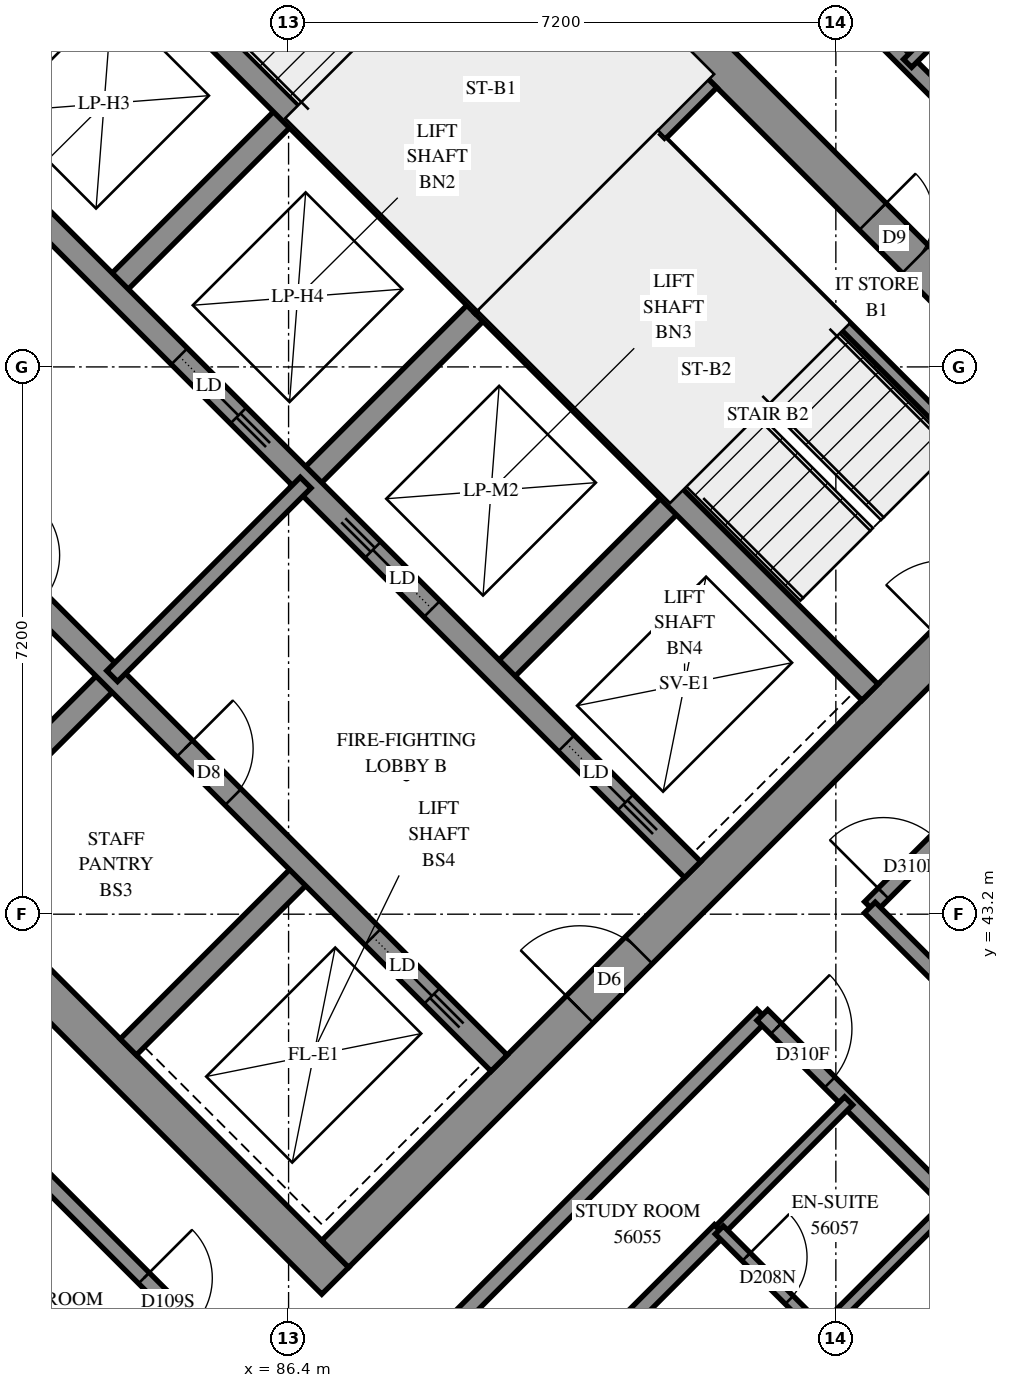
"""IFC4 building model, lengths in metres.
Left out: names, types, materials, properties, quantities, classifications, styles, units other than length and angle.
Written with IfcOpenShell. Run it as: python <this file> out.ifc"""

import sys

from ifc_helpers import new_model, si_unit, direction, frame, frame_2d, origin, place, context, subcontext, project, spatial, rectangle, extrude, element, fill, save


model = new_model("IFC4")
c1 = context("Model", 3, precision=1e-05, world=origin(), true_north=direction((0.0, 1.0)))
c2 = subcontext(c1, "Body", "Model", "MODEL_VIEW")
j1 = project(units=[si_unit("LENGTHUNIT", "METRE"), si_unit("PLANEANGLEUNIT", "RADIAN")], contexts=[c1])
p1 = place(None, origin())
s1 = spatial("IfcSite", under=j1, at=p1, CompositionType="ELEMENT")
p2 = place(p1, origin())
s2 = spatial("IfcBuilding", under=s1, at=p2, CompositionType="ELEMENT")
p3 = place(p2, frame((0.0, 0.0, 206.6)))
s3 = spatial("IfcBuildingStorey", under=s2, at=p3, CompositionType="ELEMENT", Elevation=206.6)
p4 = place(p3, frame((76.124, 49.267, -0.3), z_axis=(0.0, 0.0, 1.0), x_axis=(0.7071067812, -0.7071067812, 0.0)))
e1 = element("IfcWall", 1, at=p4, inside=s3, PredefinedType="SHEAR", context=c2, shape_type="SweptSolid", body=[
    extrude(rectangle(XDim=15.4, YDim=0.5, at=frame_2d((7.7, 0.0))), origin(), (0.0, 0.0, 1.0), 2.7),
])
p5 = place(p3, frame((86.66, 59.802, -0.3), z_axis=(0.0, 0.0, 1.0), x_axis=(0.7071067812, -0.7071067812, 0.0)))
e2 = element("IfcWall", 2, at=p5, inside=s3, PredefinedType="SHEAR", context=c2, shape_type="SweptSolid", body=[
    extrude(rectangle(XDim=15.4, YDim=0.5, at=frame_2d((7.7, 0.0))), origin(), (0.0, 0.0, 1.0), 2.7),
])
p6 = place(p5, frame((10.5, 0.0, 0.3)))
e3 = element("IfcOpeningElement", 3, at=p6, cuts=e2, PredefinedType="OPENING", context=c2, shape_type="SweptSolid", body=[
    extrude(rectangle(XDim=0.8, YDim=2.1, at=frame_2d((0.4, 1.05))), frame((0.0, 0.26, 0.0), z_axis=(0.0, -1.0, 0.0), x_axis=(1.0, 0.0, 0.0)), (0.0, 0.0, 1.0), 0.52),
])
p7 = place(p3, frame((76.478, 49.267, -0.3), z_axis=(0.0, 0.0, 1.0), x_axis=(0.7071067812, 0.7071067812, 0.0)))
e4 = element("IfcWall", 4, at=p7, inside=s3, PredefinedType="SHEAR", context=c2, shape_type="SweptSolid", body=[
    extrude(rectangle(XDim=14.4, YDim=0.5, at=frame_2d((7.2, 0.0))), origin(), (0.0, 0.0, 1.0), 2.7),
])
p8 = place(p7, frame((4.55, 0.0, 0.3)))
e5 = element("IfcOpeningElement", 5, at=p8, cuts=e4, PredefinedType="OPENING", context=c2, shape_type="SweptSolid", body=[
    extrude(rectangle(XDim=1.1, YDim=2.1, at=frame_2d((0.55, 1.05))), frame((0.0, 0.26, 0.0), z_axis=(0.0, -1.0, 0.0), x_axis=(1.0, 0.0, 0.0)), (0.0, 0.0, 1.0), 0.52),
])
p9 = place(p7, frame((11.35, 0.0, 0.3)))
e6 = element("IfcOpeningElement", 6, at=p9, cuts=e4, PredefinedType="OPENING", context=c2, shape_type="SweptSolid", body=[
    extrude(rectangle(XDim=1.1, YDim=2.1, at=frame_2d((0.55, 1.05))), frame((0.0, 0.26, 0.0), z_axis=(0.0, -1.0, 0.0), x_axis=(1.0, 0.0, 0.0)), (0.0, 0.0, 1.0), 0.52),
])
p10 = place(p3, frame((87.013, 38.731, -0.3), z_axis=(0.0, 0.0, 1.0), x_axis=(0.7071067812, 0.7071067812, 0.0)))
e7 = element("IfcWall", 7, at=p10, inside=s3, PredefinedType="SHEAR", context=c2, shape_type="SweptSolid", body=[
    extrude(rectangle(XDim=14.4, YDim=0.5, at=frame_2d((7.2, 0.0))), origin(), (0.0, 0.0, 1.0), 2.7),
])
p11 = place(p10, frame((4.55, 0.0, 0.3)))
e8 = element("IfcOpeningElement", 8, at=p11, cuts=e7, PredefinedType="OPENING", context=c2, shape_type="SweptSolid", body=[
    extrude(rectangle(XDim=1.1, YDim=2.1, at=frame_2d((0.55, 1.05))), frame((0.0, 0.26, 0.0), z_axis=(0.0, -1.0, 0.0), x_axis=(1.0, 0.0, 0.0)), (0.0, 0.0, 1.0), 0.52),
])
p12 = place(p10, frame((11.35, 0.0, 0.3)))
e9 = element("IfcOpeningElement", 9, at=p12, cuts=e7, PredefinedType="OPENING", context=c2, shape_type="SweptSolid", body=[
    extrude(rectangle(XDim=1.1, YDim=2.1, at=frame_2d((0.55, 1.05))), frame((0.0, 0.26, 0.0), z_axis=(0.0, -1.0, 0.0), x_axis=(1.0, 0.0, 0.0)), (0.0, 0.0, 1.0), 0.52),
])
p13 = place(p3, frame((84.079, 51.423, 0.0), z_axis=(0.0, 0.0, 1.0), x_axis=(0.7071219326, 0.7070916295, 0.0)))
e10 = element("IfcWall", 10, at=p13, inside=s3, PredefinedType="SOLIDWALL", context=c2, shape_type="SweptSolid", body=[
    extrude(rectangle(XDim=3.3, YDim=0.3, at=frame_2d((1.65, 0.0))), origin(), (0.0, 0.0, 1.0), 3.1),
])
p14 = place(p3, frame((81.746, 43.999, 0.0), z_axis=(0.0, 0.0, 1.0), x_axis=(0.7071067812, 0.7071067812, 0.0)))
e11 = element("IfcWall", 11, at=p14, inside=s3, PredefinedType="SOLIDWALL", context=c2, shape_type="SweptSolid", body=[
    extrude(rectangle(XDim=3.3, YDim=0.3, at=frame_2d((1.65, 0.0))), origin(), (0.0, 0.0, 1.0), 3.1),
])
p15 = place(p3, frame((86.625, 48.878, 0.0), z_axis=(0.0, 0.0, 1.0), x_axis=(0.7071067812, 0.7071067812, 0.0)))
e12 = element("IfcWall", 12, at=p15, inside=s3, PredefinedType="SOLIDWALL", context=c2, shape_type="SweptSolid", body=[
    extrude(rectangle(XDim=3.3, YDim=0.3, at=frame_2d((1.65, 0.0))), origin(), (0.0, 0.0, 1.0), 3.1),
])
p16 = place(p3, frame((84.291, 41.453, 0.0), z_axis=(0.0, 0.0, 1.0), x_axis=(0.7071067812, 0.7071067812, 0.0)))
e13 = element("IfcWall", 13, at=p16, inside=s3, PredefinedType="SOLIDWALL", context=c2, shape_type="SweptSolid", body=[
    extrude(rectangle(XDim=3.3, YDim=0.3, at=frame_2d((1.65, 0.0))), origin(), (0.0, 0.0, 1.0), 3.1),
])
p17 = place(p3, frame((89.17, 46.332, 0.0), z_axis=(0.0, 0.0, 1.0), x_axis=(0.7071067812, 0.7071067812, 0.0)))
e14 = element("IfcWall", 14, at=p17, inside=s3, PredefinedType="SOLIDWALL", context=c2, shape_type="SweptSolid", body=[
    extrude(rectangle(XDim=3.3, YDim=0.3, at=frame_2d((1.65, 0.0))), origin(), (0.0, 0.0, 1.0), 3.1),
])
p18 = place(p3, frame((78.988, 51.423, 0.0), z_axis=(0.0, 0.0, 1.0), x_axis=(0.7071067812, -0.7071067812, 0.0)))
e15 = element("IfcWall", 15, at=p18, inside=s3, PredefinedType="SOLIDWALL", context=c2, shape_type="SweptSolid", body=[
    extrude(rectangle(XDim=14.4, YDim=0.3, at=frame_2d((7.2, 0.0))), origin(), (0.0, 0.0, 1.0), 3.1),
])
p19 = place(p18, frame((1.35, 0.0, 0.0)))
e16 = element("IfcOpeningElement", 16, at=p19, cuts=e15, PredefinedType="OPENING", context=c2, shape_type="SweptSolid", body=[
    extrude(rectangle(XDim=0.9, YDim=2.1, at=frame_2d((0.45, 1.05))), frame((0.0, 0.16, 0.0), z_axis=(0.0, -1.0, 0.0), x_axis=(1.0, 0.0, 0.0)), (0.0, 0.0, 1.0), 0.32),
])
p20 = place(p18, frame((4.95, 0.0, 0.0)))
e17 = element("IfcOpeningElement", 17, at=p20, cuts=e15, PredefinedType="OPENING", context=c2, shape_type="SweptSolid", body=[
    extrude(rectangle(XDim=0.9, YDim=2.1, at=frame_2d((0.45, 1.05))), frame((0.0, 0.16, 0.0), z_axis=(0.0, -1.0, 0.0), x_axis=(1.0, 0.0, 0.0)), (0.0, 0.0, 1.0), 0.32),
])
p21 = place(p18, frame((8.55, 0.0, 0.0)))
e18 = element("IfcOpeningElement", 18, at=p21, cuts=e15, PredefinedType="OPENING", context=c2, shape_type="SweptSolid", body=[
    extrude(rectangle(XDim=0.9, YDim=2.1, at=frame_2d((0.45, 1.05))), frame((0.0, 0.16, 0.0), z_axis=(0.0, -1.0, 0.0), x_axis=(1.0, 0.0, 0.0)), (0.0, 0.0, 1.0), 0.32),
])
p22 = place(p18, frame((12.05, 0.0, 0.0)))
e19 = element("IfcOpeningElement", 19, at=p22, cuts=e15, PredefinedType="OPENING", context=c2, shape_type="SweptSolid", body=[
    extrude(rectangle(XDim=1.1, YDim=2.1, at=frame_2d((0.55, 1.05))), frame((0.0, 0.16, 0.0), z_axis=(0.0, -1.0, 0.0), x_axis=(1.0, 0.0, 0.0)), (0.0, 0.0, 1.0), 0.32),
])
p23 = place(p3, frame((81.534, 53.969, 0.0), z_axis=(0.0, 0.0, 1.0), x_axis=(0.707103309, -0.7071102534, 0.0)))
e20 = element("IfcWall", 20, at=p23, inside=s3, PredefinedType="SOLIDWALL", context=c2, shape_type="SweptSolid", body=[
    extrude(rectangle(XDim=14.4, YDim=0.3, at=frame_2d((7.2, 0.0))), origin(), (0.0, 0.0, 1.0), 3.1),
])
p24 = place(p23, frame((1.25, 0.0, 0.0)))
e21 = element("IfcOpeningElement", 21, at=p24, cuts=e20, PredefinedType="OPENING", context=c2, shape_type="SweptSolid", body=[
    extrude(rectangle(XDim=1.1, YDim=2.1, at=frame_2d((0.55, 1.05))), frame((0.0, 0.16, 0.0), z_axis=(0.0, -1.0, 0.0), x_axis=(1.0, 0.0, 0.0)), (0.0, 0.0, 1.0), 0.32),
])
p25 = place(p23, frame((4.85, 0.0, 0.0)))
e22 = element("IfcOpeningElement", 22, at=p25, cuts=e20, PredefinedType="OPENING", context=c2, shape_type="SweptSolid", body=[
    extrude(rectangle(XDim=1.1, YDim=2.1, at=frame_2d((0.55, 1.05))), frame((0.0, 0.16, 0.0), z_axis=(0.0, -1.0, 0.0), x_axis=(1.0, 0.0, 0.0)), (0.0, 0.0, 1.0), 0.32),
])
p26 = place(p23, frame((8.45, 0.0, 0.0)))
e23 = element("IfcOpeningElement", 23, at=p26, cuts=e20, PredefinedType="OPENING", context=c2, shape_type="SweptSolid", body=[
    extrude(rectangle(XDim=1.1, YDim=2.1, at=frame_2d((0.55, 1.05))), frame((0.0, 0.16, 0.0), z_axis=(0.0, -1.0, 0.0), x_axis=(1.0, 0.0, 0.0)), (0.0, 0.0, 1.0), 0.32),
])
p27 = place(p23, frame((12.05, 0.0, 0.0)))
e24 = element("IfcOpeningElement", 24, at=p27, cuts=e20, PredefinedType="OPENING", context=c2, shape_type="SweptSolid", body=[
    extrude(rectangle(XDim=1.1, YDim=2.1, at=frame_2d((0.55, 1.05))), frame((0.0, 0.16, 0.0), z_axis=(0.0, -1.0, 0.0), x_axis=(1.0, 0.0, 0.0)), (0.0, 0.0, 1.0), 0.32),
])
for number, where, z_axis, x_axis in (
    (25, (83.867, 56.302, 0.0), (0.0, 0.0, 1.0), (0.707, -0.707, 0.0)),
    (26, (88.958, 51.211, 0.0), (0.0, 0.0, 1.0), (0.707, -0.707, 0.0)),
):
    element("IfcWall", number, at=place(p3, frame(where, z_axis=z_axis, x_axis=x_axis)), inside=s3, PredefinedType="SOLIDWALL", context=c2, shape_type="SweptSolid", body=[
        extrude(rectangle(XDim=7.2, YDim=0.3, at=frame_2d((3.6, 0.0))), origin(), (0.0, 0.0, 1.0), 3.1),
    ])
p28 = place(p3, frame((88.958, 51.211, 0.0), z_axis=(0.0, 0.0, 1.0), x_axis=(0.7071067812, 0.7071067812, 0.0)))
e27 = element("IfcWall", 27, at=p28, inside=s3, PredefinedType="SOLIDWALL", context=c2, shape_type="SweptSolid", body=[
    extrude(rectangle(XDim=4.2, YDim=0.3, at=frame_2d((2.1, 0.0))), origin(), (0.0, 0.0, 1.0), 3.1),
])
p29 = place(p3, frame((91.313, 53.354, 0.0), z_axis=(0.0, 0.0, 1.0), x_axis=(0.7071140275, -0.7070995348, 0.0)))
e28 = element("IfcWall", 28, at=p29, inside=s3, PredefinedType="PARTITIONING", context=c2, shape_type="SweptSolid", body=[
    extrude(rectangle(XDim=6.9, YDim=0.15, at=frame_2d((3.45, 0.0))), origin(), (0.0, 0.0, 1.0), 3.1),
])
p30 = place(p3, frame((84.079, 46.332, 0.0), z_axis=(0.0, 0.0, 1.0), x_axis=(0.7071067812, 0.7071067812, 0.0)))
e29 = element("IfcWall", 29, at=p30, inside=s3, PredefinedType="PARTITIONING", context=c2, shape_type="SweptSolid", body=[
    extrude(rectangle(XDim=3.6, YDim=0.2, at=frame_2d((1.8, 0.0))), origin(), (0.0, 0.0, 1.0), 3.1),
])
p31 = place(p3, frame((84.996, 31.971, 0.0), z_axis=(0.0, 0.0, 1.0), x_axis=(0.7072316927, 0.7069818476, 0.0)))
e30 = element("IfcWall", 30, at=p31, inside=s3, PredefinedType="PARTITIONING", context=c2, shape_type="SweptSolid", body=[
    extrude(rectangle(XDim=10.006, YDim=0.2, at=frame_2d((5.003, 0.0))), origin(), (0.0, 0.0, 1.0), 3.1),
])
p32 = place(p3, frame((93.346, 55.599, 0.0), z_axis=(0.0, 0.0, 1.0), x_axis=(0.7071067812, -0.7071067812, 0.0)))
e31 = element("IfcWall", 31, at=p32, inside=s3, PredefinedType="PARTITIONING", context=c2, shape_type="SweptSolid", body=[
    extrude(rectangle(XDim=9.201, YDim=0.2, at=frame_2d((4.601, 0.0))), origin(), (0.0, 0.0, 1.0), 3.1),
])
p33 = place(p3, frame((94.049, 43.293, 0.0), z_axis=(0.0, 0.0, 1.0), x_axis=(0.7071067812, 0.7071067812, 0.0)))
e32 = element("IfcWall", 32, at=p33, inside=s3, PredefinedType="PARTITIONING", context=c2, shape_type="SweptSolid", body=[
    extrude(rectangle(XDim=8.2, YDim=0.2, at=frame_2d((4.1, 0.0))), origin(), (0.0, 0.0, 1.0), 3.1),
])
p34 = place(p33, frame((0.252, 0.0, 0.0)))
e33 = element("IfcOpeningElement", 33, at=p34, cuts=e32, PredefinedType="OPENING", context=c2, shape_type="SweptSolid", body=[
    extrude(rectangle(XDim=1.0, YDim=2.1, at=frame_2d((0.5, 1.05))), frame((0.0, 0.11, 0.0), z_axis=(0.0, -1.0, 0.0), x_axis=(1.0, 0.0, 0.0)), (0.0, 0.0, 1.0), 0.22),
])
p35 = place(p3, frame((86.835, 36.079, 0.0), z_axis=(0.0, 0.0, 1.0), x_axis=(0.7071067812, 0.7071067812, 0.0)))
e34 = element("IfcWall", 34, at=p35, inside=s3, PredefinedType="PARTITIONING", context=c2, shape_type="SweptSolid", body=[
    extrude(rectangle(XDim=8.2, YDim=0.2, at=frame_2d((4.1, 0.0))), origin(), (0.0, 0.0, 1.0), 3.1),
])
p36 = place(p3, frame((80.849, 42.061, 0.0), z_axis=(0.0, 0.0, 1.0), x_axis=(0.7071067812, -0.7071067812, 0.0)))
e35 = element("IfcWall", 35, at=p36, inside=s3, PredefinedType="PARTITIONING", context=c2, shape_type="SweptSolid", body=[
    extrude(rectangle(XDim=6.964, YDim=0.2, at=frame_2d((3.482, 0.0))), origin(), (0.0, 0.0, 1.0), 3.1),
])
p37 = place(p36, frame((5.159, 0.0, 0.0)))
e36 = element("IfcOpeningElement", 36, at=p37, cuts=e35, PredefinedType="OPENING", context=c2, shape_type="SweptSolid", body=[
    extrude(rectangle(XDim=0.9, YDim=2.1, at=frame_2d((0.45, 1.05))), frame((0.0, 0.11, 0.0), z_axis=(0.0, -1.0, 0.0), x_axis=(1.0, 0.0, 0.0)), (0.0, 0.0, 1.0), 0.22),
])
p38 = place(p3, frame((94.047, 43.287, 0.0), z_axis=(0.0, 0.0, 1.0), x_axis=(0.7071067812, -0.7071067812, 0.0)))
e37 = element("IfcWall", 37, at=p38, inside=s3, PredefinedType="PARTITIONING", context=c2, shape_type="SweptSolid", body=[
    extrude(rectangle(XDim=5.199, YDim=0.2, at=frame_2d((2.599, 0.0))), origin(), (0.0, 0.0, 1.0), 3.1),
])
p39 = place(p38, frame((3.898, 0.0, 0.0)))
e38 = element("IfcOpeningElement", 38, at=p39, cuts=e37, PredefinedType="OPENING", context=c2, shape_type="SweptSolid", body=[
    extrude(rectangle(XDim=0.9, YDim=2.1, at=frame_2d((0.45, 1.05))), frame((0.0, 0.11, 0.0), z_axis=(0.0, -1.0, 0.0), x_axis=(1.0, 0.0, 0.0)), (0.0, 0.0, 1.0), 0.22),
])
p40 = place(p3, frame((92.633, 41.873, 0.0), z_axis=(0.0, 0.0, 1.0), x_axis=(0.7071067812, -0.7071067812, 0.0)))
e39 = element("IfcWall", 39, at=p40, inside=s3, PredefinedType="PARTITIONING", context=c2, shape_type="SweptSolid", body=[
    extrude(rectangle(XDim=5.199, YDim=0.2, at=frame_2d((2.599, 0.0))), origin(), (0.0, 0.0, 1.0), 3.1),
])
p41 = place(p40, frame((0.253, 0.0, 0.0)))
e40 = element("IfcOpeningElement", 40, at=p41, cuts=e39, PredefinedType="OPENING", context=c2, shape_type="SweptSolid", body=[
    extrude(rectangle(XDim=1.0, YDim=2.1, at=frame_2d((0.5, 1.05))), frame((0.0, 0.11, 0.0), z_axis=(0.0, -1.0, 0.0), x_axis=(1.0, 0.0, 0.0)), (0.0, 0.0, 1.0), 0.22),
])
p42 = place(p40, frame((3.948, 0.0, 0.0)))
e41 = element("IfcOpeningElement", 41, at=p42, cuts=e39, PredefinedType="OPENING", context=c2, shape_type="SweptSolid", body=[
    extrude(rectangle(XDim=0.9, YDim=2.1, at=frame_2d((0.45, 1.05))), frame((0.0, 0.11, 0.0), z_axis=(0.0, -1.0, 0.0), x_axis=(1.0, 0.0, 0.0)), (0.0, 0.0, 1.0), 0.22),
])
for number, where, z_axis, x_axis in (
    (42, (92.072, 39.046, 0.0), (0.0, 0.0, 1.0), (0.707, 0.708, 0.0)),
    (43, (93.415, 37.703, 0.0), (0.0, 0.0, 1.0), (0.708, 0.707, 0.0)),
):
    element("IfcWall", number, at=place(p3, frame(where, z_axis=z_axis, x_axis=x_axis)), inside=s3, PredefinedType="PARTITIONING", context=c2, shape_type="SweptSolid", body=[
        extrude(rectangle(XDim=2.4, YDim=0.15, at=frame_2d((1.2, 0.0))), origin(), (0.0, 0.0, 1.0), 3.1),
    ])
p43 = place(p3, frame((94.544, 54.394, 0.0), z_axis=(0.0, 0.0, 1.0), x_axis=(0.7070860901, 0.7071274716, 0.0)))
e44 = element("IfcWall", 44, at=p43, inside=s3, PredefinedType="PARTITIONING", context=c2, shape_type="SweptSolid", body=[
    extrude(rectangle(XDim=2.417, YDim=0.15, at=frame_2d((1.208, 0.0))), origin(), (0.0, 0.0, 1.0), 3.1),
])
p44 = place(p43, frame((0.594, 0.0, 0.0)))
e45 = element("IfcOpeningElement", 45, at=p44, cuts=e44, PredefinedType="OPENING", context=c2, shape_type="SweptSolid", body=[
    extrude(rectangle(XDim=0.8, YDim=2.1, at=frame_2d((0.4, 1.05))), frame((0.0, 0.085, 0.0), z_axis=(0.0, -1.0, 0.0), x_axis=(1.0, 0.0, 0.0)), (0.0, 0.0, 1.0), 0.17),
])
p45 = place(p3, frame((94.873, 36.763, 0.0), z_axis=(0.0, 0.0, 1.0), x_axis=(0.7071067812, 0.7071067812, 0.0)))
e46 = element("IfcWall", 46, at=p45, inside=s3, PredefinedType="PARTITIONING", context=c2, shape_type="SweptSolid", body=[
    extrude(rectangle(XDim=2.034, YDim=0.2, at=frame_2d((1.017, 0.0))), origin(), (0.0, 0.0, 1.0), 2.6),
])
p46 = place(p3, frame((92.067, 39.045, 0.0), z_axis=(0.0, 0.0, 1.0), x_axis=(0.7071067812, -0.7071067812, 0.0)))
e47 = element("IfcWall", 47, at=p46, inside=s3, PredefinedType="PARTITIONING", context=c2, shape_type="SweptSolid", body=[
    extrude(rectangle(XDim=1.898, YDim=0.15, at=frame_2d((0.949, 0.0))), origin(), (0.0, 0.0, 1.0), 3.1),
])
p47 = place(p46, frame((0.501, 0.0, 0.0)))
e48 = element("IfcOpeningElement", 48, at=p47, cuts=e47, PredefinedType="OPENING", context=c2, shape_type="SweptSolid", body=[
    extrude(rectangle(XDim=0.8, YDim=2.1, at=frame_2d((0.4, 1.05))), frame((0.0, 0.085, 0.0), z_axis=(0.0, -1.0, 0.0), x_axis=(1.0, 0.0, 0.0)), (0.0, 0.0, 1.0), 0.17),
])
p48 = place(p6, origin())
e49 = element("IfcDoor", 49, at=p48, inside=s3, OperationType="SINGLE_SWING_RIGHT", PredefinedType="DOOR", context=c2, shape_type="SweptSolid", body=[
    extrude(rectangle(XDim=0.8, YDim=2.1, at=frame_2d((0.4, 1.05))), frame((0.0, 0.025, 0.0), z_axis=(0.0, -1.0, 0.0), x_axis=(1.0, 0.0, 0.0)), (0.0, 0.0, 1.0), 0.05),
])
fill(e3, e49)
p49 = place(p11, origin())
e50 = element("IfcDoor", 50, at=p49, inside=s3, OperationType="DOUBLE_DOOR_SINGLE_SWING", PredefinedType="DOOR", context=c2, shape_type="SweptSolid", body=[
    extrude(rectangle(XDim=1.1, YDim=2.1, at=frame_2d((0.55, 1.05))), frame((0.0, 0.025, 0.0), z_axis=(0.0, -1.0, 0.0), x_axis=(1.0, 0.0, 0.0)), (0.0, 0.0, 1.0), 0.05),
])
fill(e8, e50)
p50 = place(p21, origin())
e51 = element("IfcDoor", 51, at=p50, inside=s3, OperationType="SINGLE_SWING_LEFT", PredefinedType="DOOR", context=c2, shape_type="SweptSolid", body=[
    extrude(rectangle(XDim=0.9, YDim=2.1, at=frame_2d((0.45, 1.05))), frame((0.0, 0.025, 0.0), z_axis=(0.0, -1.0, 0.0), x_axis=(1.0, 0.0, 0.0)), (0.0, 0.0, 1.0), 0.05),
])
fill(e18, e51)
p51 = place(p22, origin())
e52 = element("IfcDoor", 52, at=p51, inside=s3, OperationType="SLIDING_TO_RIGHT", PredefinedType="DOOR", context=c2, shape_type="SweptSolid", body=[
    extrude(rectangle(XDim=1.1, YDim=2.1, at=frame_2d((0.55, 1.05))), frame((0.0, 0.025, 0.0), z_axis=(0.0, -1.0, 0.0), x_axis=(1.0, 0.0, 0.0)), (0.0, 0.0, 1.0), 0.05),
])
fill(e19, e52)
p52 = place(p25, origin())
e53 = element("IfcDoor", 53, at=p52, inside=s3, OperationType="SLIDING_TO_RIGHT", PredefinedType="DOOR", context=c2, shape_type="SweptSolid", body=[
    extrude(rectangle(XDim=1.1, YDim=2.1, at=frame_2d((0.55, 1.05))), frame((0.0, 0.025, 0.0), z_axis=(0.0, -1.0, 0.0), x_axis=(1.0, 0.0, 0.0)), (0.0, 0.0, 1.0), 0.05),
])
fill(e22, e53)
p53 = place(p26, origin())
e54 = element("IfcDoor", 54, at=p53, inside=s3, OperationType="SLIDING_TO_LEFT", PredefinedType="DOOR", context=c2, shape_type="SweptSolid", body=[
    extrude(rectangle(XDim=1.1, YDim=2.1, at=frame_2d((0.55, 1.05))), frame((0.0, 0.025, 0.0), z_axis=(0.0, -1.0, 0.0), x_axis=(1.0, 0.0, 0.0)), (0.0, 0.0, 1.0), 0.05),
])
fill(e23, e54)
p54 = place(p27, origin())
e55 = element("IfcDoor", 55, at=p54, inside=s3, OperationType="SLIDING_TO_RIGHT", PredefinedType="DOOR", context=c2, shape_type="SweptSolid", body=[
    extrude(rectangle(XDim=1.1, YDim=2.1, at=frame_2d((0.55, 1.05))), frame((0.0, 0.025, 0.0), z_axis=(0.0, -1.0, 0.0), x_axis=(1.0, 0.0, 0.0)), (0.0, 0.0, 1.0), 0.05),
])
fill(e24, e55)
p55 = place(p34, origin())
e56 = element("IfcDoor", 56, at=p55, inside=s3, OperationType="SINGLE_SWING_RIGHT", PredefinedType="DOOR", context=c2, shape_type="SweptSolid", body=[
    extrude(rectangle(XDim=1.0, YDim=2.1, at=frame_2d((0.5, 1.05))), frame((0.0, 0.025, 0.0), z_axis=(0.0, -1.0, 0.0), x_axis=(1.0, 0.0, 0.0)), (0.0, 0.0, 1.0), 0.05),
])
fill(e33, e56)
p56 = place(p37, origin())
e57 = element("IfcDoor", 57, at=p56, inside=s3, OperationType="SINGLE_SWING_RIGHT", PredefinedType="DOOR", context=c2, shape_type="SweptSolid", body=[
    extrude(rectangle(XDim=0.9, YDim=2.1, at=frame_2d((0.45, 1.05))), frame((0.0, 0.025, 0.0), z_axis=(0.0, -1.0, 0.0), x_axis=(1.0, 0.0, 0.0)), (0.0, 0.0, 1.0), 0.05),
])
fill(e36, e57)
p57 = place(p41, origin())
e58 = element("IfcDoor", 58, at=p57, inside=s3, OperationType="SINGLE_SWING_RIGHT", PredefinedType="DOOR", context=c2, shape_type="SweptSolid", body=[
    extrude(rectangle(XDim=1.0, YDim=2.1, at=frame_2d((0.5, 1.05))), frame((0.0, 0.025, 0.0), z_axis=(0.0, -1.0, 0.0), x_axis=(1.0, 0.0, 0.0)), (0.0, 0.0, 1.0), 0.05),
])
fill(e40, e58)
p58 = place(p47, origin())
e59 = element("IfcDoor", 59, at=p58, inside=s3, OperationType="SINGLE_SWING_RIGHT", PredefinedType="DOOR", context=c2, shape_type="SweptSolid", body=[
    extrude(rectangle(XDim=0.8, YDim=2.1, at=frame_2d((0.4, 1.05))), frame((0.0, 0.025, 0.0), z_axis=(0.0, -1.0, 0.0), x_axis=(1.0, 0.0, 0.0)), (0.0, 0.0, 1.0), 0.05),
])
fill(e48, e59)
save(model, sys.argv[1])
